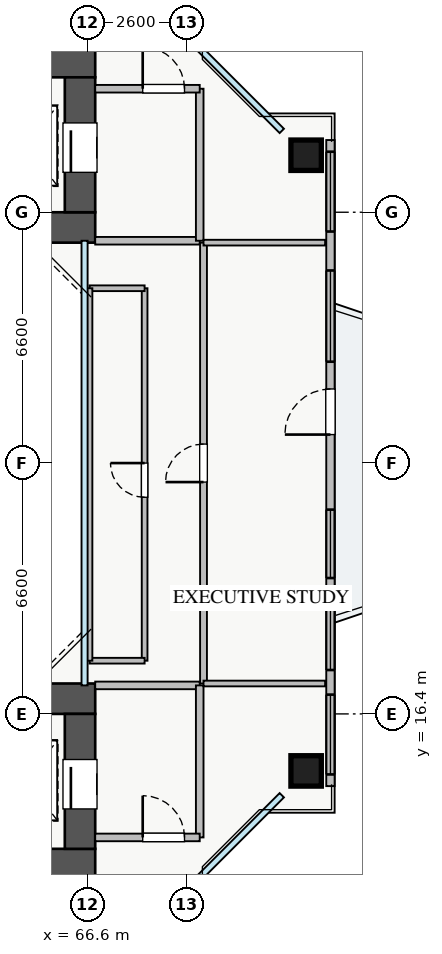
"""IFC4 building model, lengths in metres.
Left out: names, types, materials, properties, quantities, classifications, styles, units other than length and angle.
Written with IfcOpenShell. Run it as: python <this file> out.ifc"""

import sys

from ifc_helpers import new_model, si_unit, direction, frame, frame_2d, origin, origin_2d, place, context, subcontext, project, spatial, rectangle, extrude, source, transform, mapped, element, fill, save


model = new_model("IFC4")
c1 = context("Model", 3, precision=1e-05, world=origin(), true_north=direction((0.0, 1.0)))
c2 = subcontext(c1, "Body", "Model", "MODEL_VIEW")
j1 = project(units=[si_unit("LENGTHUNIT", "METRE"), si_unit("PLANEANGLEUNIT", "RADIAN")], contexts=[c1])
p1 = place(None, origin())
s1 = spatial("IfcSite", under=j1, at=p1, CompositionType="ELEMENT")
p2 = place(p1, origin())
s2 = spatial("IfcBuilding", under=s1, at=p2, CompositionType="ELEMENT")
p3 = place(p2, frame((0.0, 0.0, 69.75)))
s3 = spatial("IfcBuildingStorey", under=s2, at=p3, CompositionType="ELEMENT", Elevation=69.75)
p4 = place(p3, frame((54.2, 29.2, 0.0), z_axis=(0.0, 0.0, 1.0), x_axis=(1.0, 0.0, 0.0)))
e1 = element("IfcWall", 1, at=p4, inside=s3, PredefinedType="SHEAR", context=c2, shape_type="SweptSolid", body=[
    extrude(rectangle(XDim=12.6, YDim=0.8, at=frame_2d((6.3, 0.0))), origin(), (0.0, 0.0, 1.0), 3.25),
])
p5 = place(p3, frame((54.2, 33.55, 0.0), z_axis=(0.0, 0.0, 1.0), x_axis=(1.0, 0.0, 0.0)))
e2 = element("IfcWall", 2, at=p5, inside=s3, PredefinedType="SHEAR", context=c2, shape_type="SweptSolid", body=[
    extrude(rectangle(XDim=12.6, YDim=0.8, at=frame_2d((6.3, 0.0))), origin(), (0.0, 0.0, 1.0), 3.25),
])
p6 = place(p5, frame((8.2, 0.0, 0.0)))
e3 = element("IfcOpeningElement", 3, at=p6, cuts=e2, PredefinedType="OPENING", context=c2, shape_type="SweptSolid", body=[
    extrude(rectangle(XDim=1.1, YDim=2.05, at=frame_2d((0.55, 1.025))), frame((0.0, 0.41, 0.0), z_axis=(0.0, -1.0, 0.0), x_axis=(1.0, 0.0, 0.0)), (0.0, 0.0, 1.0), 0.82),
])
p7 = place(p3, frame((66.4, 29.6, 0.0), z_axis=(0.0, 0.0, 1.0), x_axis=(0.0, 1.0, 0.0)))
e4 = element("IfcWall", 4, at=p7, inside=s3, PredefinedType="SHEAR", context=c2, shape_type="SweptSolid", body=[
    extrude(rectangle(XDim=3.55, YDim=0.8, at=frame_2d((1.775, 0.0))), origin(), (0.0, 0.0, 1.0), 3.25),
])
p8 = place(p7, frame((1.05, 0.0, 0.0)))
e5 = element("IfcOpeningElement", 5, at=p8, cuts=e4, PredefinedType="OPENING", context=c2, shape_type="SweptSolid", body=[
    extrude(rectangle(XDim=1.3, YDim=2.05, at=frame_2d((0.65, 1.025))), frame((0.0, 0.41, 0.0), z_axis=(0.0, -1.0, 0.0), x_axis=(1.0, 0.0, 0.0)), (0.0, 0.0, 1.0), 0.82),
])
p9 = place(p3, frame((54.2, 12.45, 0.0), z_axis=(0.0, 0.0, 1.0), x_axis=(1.0, 0.0, 0.0)))
e6 = element("IfcWall", 6, at=p9, inside=s3, PredefinedType="SHEAR", context=c2, shape_type="SweptSolid", body=[
    extrude(rectangle(XDim=12.6, YDim=0.8, at=frame_2d((6.3, 0.0))), origin(), (0.0, 0.0, 1.0), 3.25),
])
p10 = place(p9, frame((8.2, 0.0, 0.0)))
e7 = element("IfcOpeningElement", 7, at=p10, cuts=e6, PredefinedType="OPENING", context=c2, shape_type="SweptSolid", body=[
    extrude(rectangle(XDim=1.1, YDim=2.05, at=frame_2d((0.55, 1.025))), frame((0.0, 0.41, 0.0), z_axis=(0.0, -1.0, 0.0), x_axis=(1.0, 0.0, 0.0)), (0.0, 0.0, 1.0), 0.82),
])
p11 = place(p3, frame((54.2, 16.8, 0.0), z_axis=(0.0, 0.0, 1.0), x_axis=(1.0, 0.0, 0.0)))
e8 = element("IfcWall", 8, at=p11, inside=s3, PredefinedType="SHEAR", context=c2, shape_type="SweptSolid", body=[
    extrude(rectangle(XDim=12.6, YDim=0.8, at=frame_2d((6.3, 0.0))), origin(), (0.0, 0.0, 1.0), 3.25),
])
p12 = place(p3, frame((66.4, 12.85, 0.0), z_axis=(0.0, 0.0, 1.0), x_axis=(0.0, 1.0, 0.0)))
e9 = element("IfcWall", 9, at=p12, inside=s3, PredefinedType="SHEAR", context=c2, shape_type="SweptSolid", body=[
    extrude(rectangle(XDim=3.55, YDim=0.8, at=frame_2d((1.775, 0.0))), origin(), (0.0, 0.0, 1.0), 3.25),
])
p13 = place(p12, frame((1.05, 0.0, 0.0)))
e10 = element("IfcOpeningElement", 10, at=p13, cuts=e9, PredefinedType="OPENING", context=c2, shape_type="SweptSolid", body=[
    extrude(rectangle(XDim=1.3, YDim=2.05, at=frame_2d((0.65, 1.025))), frame((0.0, 0.41, 0.0), z_axis=(0.0, -1.0, 0.0), x_axis=(1.0, 0.0, 0.0)), (0.0, 0.0, 1.0), 0.82),
])
m1 = source(origin(), c2, "Body", "SweptSolid", [
    extrude(rectangle(XDim=0.8, YDim=0.8, at=origin_2d()), origin(), (0.0, 0.0, 1.0), 3.25),
])
for number, where, z_axis, x_axis in (
    (11, (72.35, 14.9, 0.0), (0.0, 0.0, 1.0), (1.0, 0.0, 0.0)),
    (12, (72.35, 31.1, 0.0), (0.0, 0.0, 1.0), (1.0, 0.0, 0.0)),
):
    element("IfcColumn", number, at=place(p3, frame(where, z_axis=z_axis, x_axis=x_axis)), inside=s3, PredefinedType="COLUMN", context=c2, shape_type="MappedRepresentation", body=[
        mapped(m1, transform((0.0, 0.0, 0.0), x_axis=(1.0, 0.0, 0.0), y_axis=(0.0, 1.0, 0.0), z_axis=(0.0, 0.0, 1.0), scale=1.0)),
    ])
p14 = place(p3, frame((72.99, 14.5, 0.0), z_axis=(0.0, 0.0, 1.0), x_axis=(0.0, 1.0, 0.0)))
e13 = element("IfcWall", 13, at=p14, inside=s3, PredefinedType="STANDARD", context=c2, shape_type="SweptSolid", body=[
    extrude(rectangle(XDim=17.0, YDim=0.22, at=frame_2d((8.5, 0.0))), origin(), (0.0, 0.0, 1.0), 2.61),
])
p15 = place(p14, frame((9.25, 0.0, 0.0)))
e14 = element("IfcOpeningElement", 14, at=p15, cuts=e13, PredefinedType="OPENING", context=c2, shape_type="SweptSolid", body=[
    extrude(rectangle(XDim=1.2, YDim=2.1, at=frame_2d((0.6, 1.05))), frame((0.0, 0.12, 0.0), z_axis=(0.0, -1.0, 0.0), x_axis=(1.0, 0.0, 0.0)), (0.0, 0.0, 1.0), 0.24),
])
p16 = place(p14, frame((0.308, 0.0, 0.9)))
e15 = element("IfcOpeningElement", 15, at=p16, cuts=e13, PredefinedType="OPENING", context=c2, shape_type="SweptSolid", body=[
    extrude(rectangle(XDim=2.1, YDim=1.5, at=frame_2d((1.05, 0.75))), frame((0.0, 0.12, 0.0), z_axis=(0.0, -1.0, 0.0), x_axis=(1.0, 0.0, 0.0)), (0.0, 0.0, 1.0), 0.24),
])
p17 = place(p14, frame((5.475, 0.0, 0.9)))
e16 = element("IfcOpeningElement", 16, at=p17, cuts=e13, PredefinedType="OPENING", context=c2, shape_type="SweptSolid", body=[
    extrude(rectangle(XDim=1.8, YDim=1.45, at=frame_2d((0.9, 0.725))), frame((0.0, 0.12, 0.0), z_axis=(0.0, -1.0, 0.0), x_axis=(1.0, 0.0, 0.0)), (0.0, 0.0, 1.0), 0.24),
])
p18 = place(p14, frame((14.593, 0.0, 0.9)))
e17 = element("IfcOpeningElement", 17, at=p18, cuts=e13, PredefinedType="OPENING", context=c2, shape_type="SweptSolid", body=[
    extrude(rectangle(XDim=2.1, YDim=1.5, at=frame_2d((1.05, 0.75))), frame((0.0, 0.12, 0.0), z_axis=(0.0, -1.0, 0.0), x_axis=(1.0, 0.0, 0.0)), (0.0, 0.0, 1.0), 0.24),
])
p19 = place(p14, frame((3.055, 0.0, 0.9)))
e18 = element("IfcOpeningElement", 18, at=p19, cuts=e13, PredefinedType="OPENING", context=c2, shape_type="SweptSolid", body=[
    extrude(rectangle(XDim=2.1, YDim=1.5, at=frame_2d((1.05, 0.75))), frame((0.0, 0.12, 0.0), z_axis=(0.0, -1.0, 0.0), x_axis=(1.0, 0.0, 0.0)), (0.0, 0.0, 1.0), 0.24),
])
p20 = place(p14, frame((11.167, 0.0, 0.9)))
e19 = element("IfcOpeningElement", 19, at=p20, cuts=e13, PredefinedType="OPENING", context=c2, shape_type="SweptSolid", body=[
    extrude(rectangle(XDim=2.4, YDim=1.5, at=frame_2d((1.2, 0.75))), frame((0.0, 0.12, 0.0), z_axis=(0.0, -1.0, 0.0), x_axis=(1.0, 0.0, 0.0)), (0.0, 0.0, 1.0), 0.24),
])
p21 = place(p3, frame((66.8, 28.85, 0.0), z_axis=(0.0, 0.0, 1.0), x_axis=(1.0, 0.0, 0.0)))
e20 = element("IfcWall", 20, at=p21, inside=s3, PredefinedType="PARTITIONING", context=c2, shape_type="SweptSolid", body=[
    extrude(rectangle(XDim=2.75, YDim=0.2, at=frame_2d((1.375, 0.0))), origin(), (0.0, 0.0, 1.0), 3.07),
])
p22 = place(p3, frame((69.55, 28.85, 0.0), z_axis=(0.0, 0.0, 1.0), x_axis=(0.0, 1.0, 0.0)))
e21 = element("IfcWall", 21, at=p22, inside=s3, PredefinedType="PARTITIONING", context=c2, shape_type="SweptSolid", body=[
    extrude(rectangle(XDim=4.0, YDim=0.2, at=frame_2d((2.0, 0.0))), origin(), (0.0, 0.0, 1.0), 3.07),
])
p23 = place(p3, frame((66.8, 32.85, 0.0), z_axis=(0.0, 0.0, 1.0), x_axis=(1.0, 0.0, 0.0)))
e22 = element("IfcWall", 22, at=p23, inside=s3, PredefinedType="PARTITIONING", context=c2, shape_type="SweptSolid", body=[
    extrude(rectangle(XDim=2.75, YDim=0.2, at=frame_2d((1.375, 0.0))), origin(), (0.0, 0.0, 1.0), 3.07),
])
p24 = place(p23, frame((1.25, 0.0, 0.0)))
e23 = element("IfcOpeningElement", 23, at=p24, cuts=e22, PredefinedType="OPENING", context=c2, shape_type="SweptSolid", body=[
    extrude(rectangle(XDim=1.1, YDim=2.05, at=frame_2d((0.55, 1.025))), frame((0.0, 0.11, 0.0), z_axis=(0.0, -1.0, 0.0), x_axis=(1.0, 0.0, 0.0)), (0.0, 0.0, 1.0), 0.22),
])
p25 = place(p3, frame((66.8, 17.15, 0.0), z_axis=(0.0, 0.0, 1.0), x_axis=(1.0, 0.0, 0.0)))
e24 = element("IfcWall", 24, at=p25, inside=s3, PredefinedType="PARTITIONING", context=c2, shape_type="SweptSolid", body=[
    extrude(rectangle(XDim=2.75, YDim=0.2, at=frame_2d((1.375, 0.0))), origin(), (0.0, 0.0, 1.0), 3.07),
])
p26 = place(p3, frame((69.55, 13.15, 0.0), z_axis=(0.0, 0.0, 1.0), x_axis=(0.0, 1.0, 0.0)))
e25 = element("IfcWall", 25, at=p26, inside=s3, PredefinedType="PARTITIONING", context=c2, shape_type="SweptSolid", body=[
    extrude(rectangle(XDim=4.0, YDim=0.2, at=frame_2d((2.0, 0.0))), origin(), (0.0, 0.0, 1.0), 3.07),
])
p27 = place(p3, frame((66.8, 13.15, 0.0), z_axis=(0.0, 0.0, 1.0), x_axis=(1.0, 0.0, 0.0)))
e26 = element("IfcWall", 26, at=p27, inside=s3, PredefinedType="PARTITIONING", context=c2, shape_type="SweptSolid", body=[
    extrude(rectangle(XDim=2.75, YDim=0.2, at=frame_2d((1.375, 0.0))), origin(), (0.0, 0.0, 1.0), 3.07),
])
p28 = place(p27, frame((1.25, 0.0, 0.0)))
e27 = element("IfcOpeningElement", 27, at=p28, cuts=e26, PredefinedType="OPENING", context=c2, shape_type="SweptSolid", body=[
    extrude(rectangle(XDim=1.1, YDim=2.05, at=frame_2d((0.55, 1.025))), frame((0.0, 0.11, 0.0), z_axis=(0.0, -1.0, 0.0), x_axis=(1.0, 0.0, 0.0)), (0.0, 0.0, 1.0), 0.22),
])
p29 = place(p3, frame((69.65, 17.2, 0.0), z_axis=(0.0, 0.0, 1.0), x_axis=(0.0, 1.0, 0.0)))
e28 = element("IfcWall", 28, at=p29, inside=s3, PredefinedType="PARTITIONING", context=c2, shape_type="SweptSolid", body=[
    extrude(rectangle(XDim=11.6, YDim=0.18, at=frame_2d((5.8, 0.0))), origin(), (0.0, 0.0, 1.0), 3.07),
])
p30 = place(p29, frame((5.3, 0.0, 0.0)))
e29 = element("IfcOpeningElement", 29, at=p30, cuts=e28, PredefinedType="OPENING", context=c2, shape_type="SweptSolid", body=[
    extrude(rectangle(XDim=1.0, YDim=2.05, at=frame_2d((0.5, 1.025))), frame((0.0, 0.1, 0.0), z_axis=(0.0, -1.0, 0.0), x_axis=(1.0, 0.0, 0.0)), (0.0, 0.0, 1.0), 0.2),
])
for number, where, z_axis, x_axis in (
    (30, (69.65, 17.2, 0.0), (0.0, 0.0, 1.0), (1.0, 0.0, 0.0)),
    (31, (69.65, 28.8, 0.0), (0.0, 0.0, 1.0), (1.0, 0.0, 0.0)),
):
    element("IfcWall", number, at=place(p3, frame(where, z_axis=z_axis, x_axis=x_axis)), inside=s3, PredefinedType="PARTITIONING", context=c2, shape_type="SweptSolid", body=[
        extrude(rectangle(XDim=3.2, YDim=0.15, at=frame_2d((1.6, 0.0))), origin(), (0.0, 0.0, 1.0), 3.07),
    ])
p31 = place(p3, frame((68.1, 17.8, 0.0), z_axis=(0.0, 0.0, 1.0), x_axis=(0.0, 1.0, 0.0)))
e32 = element("IfcWall", 32, at=p31, inside=s3, PredefinedType="PARTITIONING", context=c2, shape_type="SweptSolid", body=[
    extrude(rectangle(XDim=9.8, YDim=0.15, at=frame_2d((4.9, 0.0))), origin(), (0.0, 0.0, 1.0), 3.07),
])
p32 = place(p31, frame((4.3, 0.0, 0.0)))
e33 = element("IfcOpeningElement", 33, at=p32, cuts=e32, PredefinedType="OPENING", context=c2, shape_type="SweptSolid", body=[
    extrude(rectangle(XDim=0.9, YDim=2.05, at=frame_2d((0.45, 1.025))), frame((0.0, 0.085, 0.0), z_axis=(0.0, -1.0, 0.0), x_axis=(1.0, 0.0, 0.0)), (0.0, 0.0, 1.0), 0.17),
])
p33 = place(p3, frame((66.65, 27.6, 0.0), z_axis=(0.0, 0.0, 1.0), x_axis=(1.0, 0.0, 0.0)))
e34 = element("IfcWall", 34, at=p33, inside=s3, PredefinedType="PARTITIONING", context=c2, shape_type="SweptSolid", body=[
    extrude(rectangle(XDim=1.45, YDim=0.15, at=frame_2d((0.725, 0.0))), origin(), (0.0, 0.0, 1.0), 2.821),
])
p34 = place(p3, frame((66.65, 17.8, 0.0), z_axis=(0.0, 0.0, 1.0), x_axis=(1.0, 0.0, 0.0)))
e35 = element("IfcWall", 35, at=p34, inside=s3, PredefinedType="PARTITIONING", context=c2, shape_type="SweptSolid", body=[
    extrude(rectangle(XDim=1.45, YDim=0.15, at=frame_2d((0.725, 0.0))), origin(), (0.0, 0.0, 1.0), 3.07),
])
p35 = place(p3, frame((66.65, 17.8, 0.0), z_axis=(0.0, 0.0, 1.0), x_axis=(0.0, 1.0, 0.0)))
e36 = element("IfcWall", 36, at=p35, inside=s3, PredefinedType="PARTITIONING", context=c2, shape_type="SweptSolid", body=[
    extrude(rectangle(XDim=9.8, YDim=0.15, at=frame_2d((4.9, 0.0))), origin(), (0.0, 0.0, 1.0), 2.665),
])
m2 = source(origin(), c2, "Body", "SweptSolid", [
    extrude(rectangle(XDim=1.2, YDim=2.1, at=frame_2d((0.6, 1.05))), frame((0.0, 0.025, 0.0), z_axis=(0.0, -1.0, 0.0), x_axis=(1.0, 0.0, 0.0)), (0.0, 0.0, 1.0), 0.05),
])
p36 = place(p15, origin())
e37 = element("IfcDoor", 37, at=p36, inside=s3, OperationType="SINGLE_SWING_LEFT", PredefinedType="DOOR", context=c2, shape_type="MappedRepresentation", body=[
    mapped(m2, transform((0.0, 0.0, 0.0), x_axis=(1.0, 0.0, 0.0), y_axis=(0.0, 1.0, 0.0), z_axis=(0.0, 0.0, 1.0), scale=1.0)),
])
fill(e14, e37)
m3 = source(origin(), c2, "Body", "SweptSolid", [
    extrude(rectangle(XDim=2.1, YDim=1.5, at=frame_2d((1.05, 0.75))), frame((0.0, 0.03, 0.0), z_axis=(0.0, -1.0, 0.0), x_axis=(1.0, 0.0, 0.0)), (0.0, 0.0, 1.0), 0.06),
])
p37 = place(p16, origin())
e38 = element("IfcWindow", 38, at=p37, inside=s3, PartitioningType="TRIPLE_PANEL_VERTICAL", PredefinedType="WINDOW", context=c2, shape_type="MappedRepresentation", body=[
    mapped(m3, transform((0.0, 0.0, 0.0), x_axis=(1.0, 0.0, 0.0), y_axis=(0.0, 1.0, 0.0), z_axis=(0.0, 0.0, 1.0), scale=1.0)),
])
fill(e15, e38)
m4 = source(origin(), c2, "Body", "SweptSolid", [
    extrude(rectangle(XDim=1.8, YDim=1.45, at=frame_2d((0.9, 0.725))), frame((0.0, 0.03, 0.0), z_axis=(0.0, -1.0, 0.0), x_axis=(1.0, 0.0, 0.0)), (0.0, 0.0, 1.0), 0.06),
])
p38 = place(p17, origin())
e39 = element("IfcWindow", 39, at=p38, inside=s3, PartitioningType="DOUBLE_PANEL_VERTICAL", PredefinedType="WINDOW", context=c2, shape_type="MappedRepresentation", body=[
    mapped(m4, transform((0.0, 0.0, 0.0), x_axis=(1.0, 0.0, 0.0), y_axis=(0.0, 1.0, 0.0), z_axis=(0.0, 0.0, 1.0), scale=1.0)),
])
fill(e16, e39)
p39 = place(p18, origin())
e40 = element("IfcWindow", 40, at=p39, inside=s3, PartitioningType="TRIPLE_PANEL_VERTICAL", PredefinedType="WINDOW", context=c2, shape_type="MappedRepresentation", body=[
    mapped(m3, transform((0.0, 0.0, 0.0), x_axis=(1.0, 0.0, 0.0), y_axis=(0.0, 1.0, 0.0), z_axis=(0.0, 0.0, 1.0), scale=1.0)),
])
fill(e17, e40)
m5 = source(origin(), c2, "Body", "SweptSolid", [
    extrude(rectangle(XDim=1.3, YDim=2.05, at=frame_2d((0.65, 1.025))), frame((0.0, 0.025, 0.0), z_axis=(0.0, -1.0, 0.0), x_axis=(1.0, 0.0, 0.0)), (0.0, 0.0, 1.0), 0.05),
])
p40 = place(p8, origin())
e41 = element("IfcDoor", 41, at=p40, inside=s3, OperationType="SLIDING_TO_LEFT", PredefinedType="DOOR", context=c2, shape_type="MappedRepresentation", body=[
    mapped(m5, transform((0.0, 0.0, 0.0), x_axis=(1.0, 0.0, 0.0), y_axis=(0.0, 1.0, 0.0), z_axis=(0.0, 0.0, 1.0), scale=1.0)),
])
fill(e5, e41)
p41 = place(p13, origin())
e42 = element("IfcDoor", 42, at=p41, inside=s3, OperationType="SLIDING_TO_RIGHT", PredefinedType="DOOR", context=c2, shape_type="MappedRepresentation", body=[
    mapped(m5, transform((0.0, 0.0, 0.0), x_axis=(1.0, 0.0, 0.0), y_axis=(0.0, 1.0, 0.0), z_axis=(0.0, 0.0, 1.0), scale=1.0)),
])
fill(e10, e42)
m6 = source(origin(), c2, "Body", "SweptSolid", [
    extrude(rectangle(XDim=1.1, YDim=2.05, at=frame_2d((0.55, 1.025))), frame((0.0, 0.025, 0.0), z_axis=(0.0, -1.0, 0.0), x_axis=(1.0, 0.0, 0.0)), (0.0, 0.0, 1.0), 0.05),
])
p42 = place(p24, origin())
e43 = element("IfcDoor", 43, at=p42, inside=s3, OperationType="SINGLE_SWING_LEFT", PredefinedType="DOOR", context=c2, shape_type="MappedRepresentation", body=[
    mapped(m6, transform((0.0, 0.0, 0.0), x_axis=(1.0, 0.0, 0.0), y_axis=(0.0, 1.0, 0.0), z_axis=(0.0, 0.0, 1.0), scale=1.0)),
])
fill(e23, e43)
p43 = place(p28, origin())
e44 = element("IfcDoor", 44, at=p43, inside=s3, OperationType="SINGLE_SWING_LEFT", PredefinedType="DOOR", context=c2, shape_type="MappedRepresentation", body=[
    mapped(m6, transform((0.0, 0.0, 0.0), x_axis=(1.0, 0.0, 0.0), y_axis=(0.0, 1.0, 0.0), z_axis=(0.0, 0.0, 1.0), scale=1.0)),
])
fill(e27, e44)
m7 = source(origin(), c2, "Body", "SweptSolid", [
    extrude(rectangle(XDim=1.0, YDim=2.05, at=frame_2d((0.5, 1.025))), frame((0.0, 0.025, 0.0), z_axis=(0.0, -1.0, 0.0), x_axis=(1.0, 0.0, 0.0)), (0.0, 0.0, 1.0), 0.05),
])
p44 = place(p30, origin())
e45 = element("IfcDoor", 45, at=p44, inside=s3, OperationType="SINGLE_SWING_LEFT", PredefinedType="DOOR", context=c2, shape_type="MappedRepresentation", body=[
    mapped(m7, transform((0.0, 0.0, 0.0), x_axis=(1.0, 0.0, 0.0), y_axis=(0.0, 1.0, 0.0), z_axis=(0.0, 0.0, 1.0), scale=1.0)),
])
fill(e29, e45)
m8 = source(origin(), c2, "Body", "SweptSolid", [
    extrude(rectangle(XDim=0.9, YDim=2.05, at=frame_2d((0.45, 1.025))), frame((0.0, 0.025, 0.0), z_axis=(0.0, -1.0, 0.0), x_axis=(1.0, 0.0, 0.0)), (0.0, 0.0, 1.0), 0.05),
])
p45 = place(p32, origin())
e46 = element("IfcDoor", 46, at=p45, inside=s3, OperationType="SINGLE_SWING_RIGHT", PredefinedType="DOOR", context=c2, shape_type="MappedRepresentation", body=[
    mapped(m8, transform((0.0, 0.0, 0.0), x_axis=(1.0, 0.0, 0.0), y_axis=(0.0, 1.0, 0.0), z_axis=(0.0, 0.0, 1.0), scale=1.0)),
])
fill(e33, e46)
p46 = place(p19, origin())
e47 = element("IfcWindow", 47, at=p46, inside=s3, PartitioningType="TRIPLE_PANEL_VERTICAL", PredefinedType="WINDOW", context=c2, shape_type="MappedRepresentation", body=[
    mapped(m3, transform((0.0, 0.0, 0.0), x_axis=(1.0, 0.0, 0.0), y_axis=(0.0, 1.0, 0.0), z_axis=(0.0, 0.0, 1.0), scale=1.0)),
])
fill(e18, e47)
m9 = source(origin(), c2, "Body", "SweptSolid", [
    extrude(rectangle(XDim=2.4, YDim=1.5, at=frame_2d((1.2, 0.75))), frame((0.0, 0.03, 0.0), z_axis=(0.0, -1.0, 0.0), x_axis=(1.0, 0.0, 0.0)), (0.0, 0.0, 1.0), 0.06),
])
p47 = place(p20, origin())
e48 = element("IfcWindow", 48, at=p47, inside=s3, PartitioningType="TRIPLE_PANEL_VERTICAL", PredefinedType="WINDOW", context=c2, shape_type="MappedRepresentation", body=[
    mapped(m9, transform((0.0, 0.0, 0.0), x_axis=(1.0, 0.0, 0.0), y_axis=(0.0, 1.0, 0.0), z_axis=(0.0, 0.0, 1.0), scale=1.0)),
])
fill(e19, e48)
save(model, sys.argv[1])
